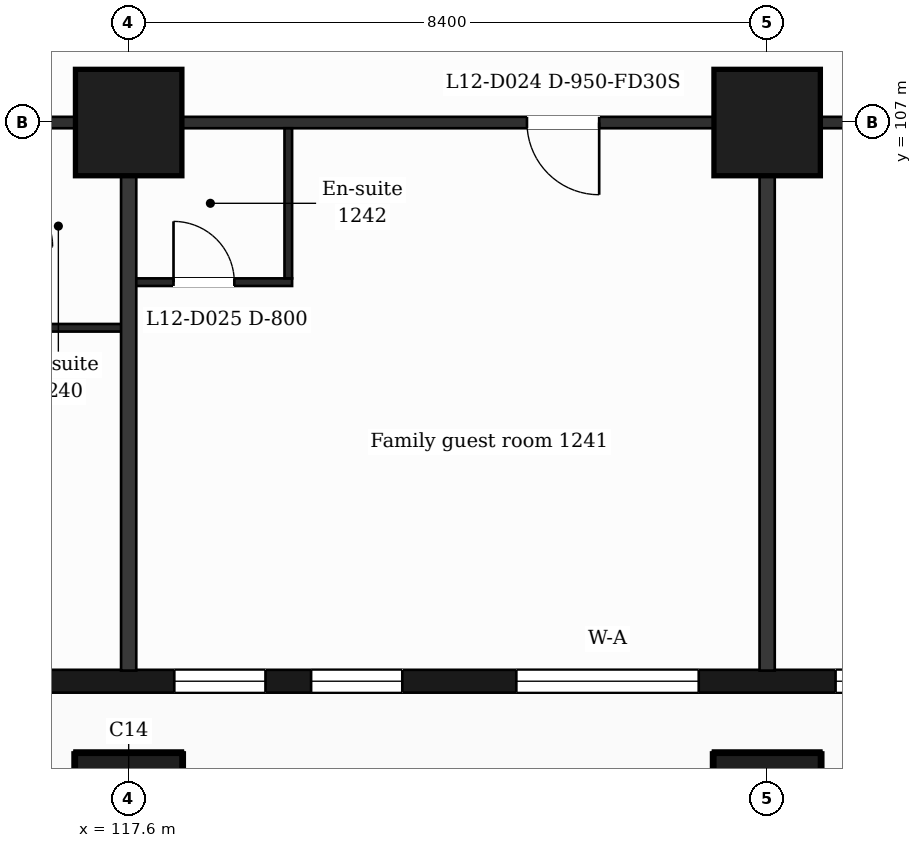
"""IFC4 building model, lengths in metres.
Left out: names, types, materials, properties, quantities, classifications, styles, units other than length and angle.
Written with IfcOpenShell. Run it as: python <this file> out.ifc"""

import sys

from ifc_helpers import new_model, si_unit, direction, frame, frame_2d, origin, origin_2d, place, context, subcontext, project, spatial, rectangle, extrude, element, fill, save


model = new_model("IFC4")
c1 = context("Model", 3, precision=1e-05, world=origin(), true_north=direction((0.0, 1.0)))
c2 = subcontext(c1, "Body", "Model", "MODEL_VIEW")
j1 = project(units=[si_unit("LENGTHUNIT", "METRE"), si_unit("PLANEANGLEUNIT", "RADIAN")], contexts=[c1])
p1 = place(None, origin())
s1 = spatial("IfcSite", under=j1, at=p1, CompositionType="ELEMENT")
p2 = place(p1, origin())
s2 = spatial("IfcBuilding", under=s1, at=p2, CompositionType="ELEMENT")
p3 = place(p2, frame((0.0, 0.0, 60.0)))
s3 = spatial("IfcBuildingStorey", under=s2, at=p3, CompositionType="ELEMENT", Elevation=60.0)
for number, where, z_axis, x_axis in (
    (1, (117.6, 98.0, 0.0), (0.0, 0.0, 1.0), (1.0, 0.0, 0.0)),
    (2, (126.0, 98.0, 0.0), (0.0, 0.0, 1.0), (1.0, 0.0, 0.0)),
    (3, (117.6, 107.0, 0.0), (0.0, 0.0, 1.0), (1.0, 0.0, 0.0)),
    (4, (126.0, 107.0, 0.0), (0.0, 0.0, 1.0), (1.0, 0.0, 0.0)),
):
    element("IfcColumn", number, at=place(p3, frame(where, z_axis=z_axis, x_axis=x_axis)), inside=s3, PredefinedType="COLUMN", context=c2, shape_type="SweptSolid", body=[
        extrude(rectangle(XDim=1.4, YDim=1.4, at=origin_2d()), origin(), (0.0, 0.0, 1.0), 3.5),
    ])
p4 = place(p3, frame((89.85, 99.65, 0.0), z_axis=(0.0, 0.0, 1.0), x_axis=(1.0, 0.0, 0.0)))
e5 = element("IfcWall", 5, at=p4, inside=s3, PredefinedType="SOLIDWALL", context=c2, shape_type="SweptSolid", body=[
    extrude(rectangle(XDim=47.25, YDim=0.3, at=frame_2d((23.625, 0.0))), origin(), (0.0, 0.0, 1.0), 3.18),
])
p5 = place(p4, frame((0.725, 0.0, 0.9)))
e6 = element("IfcOpeningElement", 6, at=p5, cuts=e5, PredefinedType="OPENING", context=c2, shape_type="SweptSolid", body=[
    extrude(rectangle(XDim=1.2, YDim=2.1, at=frame_2d((0.6, 1.05))), frame((0.0, 0.16, 0.0), z_axis=(0.0, -1.0, 0.0), x_axis=(1.0, 0.0, 0.0)), (0.0, 0.0, 1.0), 0.32),
])
p6 = place(p4, frame((3.45, 0.0, 0.9)))
e7 = element("IfcOpeningElement", 7, at=p6, cuts=e5, PredefinedType="OPENING", context=c2, shape_type="SweptSolid", body=[
    extrude(rectangle(XDim=2.4, YDim=2.1, at=frame_2d((1.2, 1.05))), frame((0.0, 0.16, 0.0), z_axis=(0.0, -1.0, 0.0), x_axis=(1.0, 0.0, 0.0)), (0.0, 0.0, 1.0), 0.32),
])
p7 = place(p4, frame((7.65, 0.0, 0.9)))
e8 = element("IfcOpeningElement", 8, at=p7, cuts=e5, PredefinedType="OPENING", context=c2, shape_type="SweptSolid", body=[
    extrude(rectangle(XDim=2.4, YDim=2.1, at=frame_2d((1.2, 1.05))), frame((0.0, 0.16, 0.0), z_axis=(0.0, -1.0, 0.0), x_axis=(1.0, 0.0, 0.0)), (0.0, 0.0, 1.0), 0.32),
])
p8 = place(p4, frame((12.45, 0.0, 0.9)))
e9 = element("IfcOpeningElement", 9, at=p8, cuts=e5, PredefinedType="OPENING", context=c2, shape_type="SweptSolid", body=[
    extrude(rectangle(XDim=1.2, YDim=2.1, at=frame_2d((0.6, 1.05))), frame((0.0, 0.16, 0.0), z_axis=(0.0, -1.0, 0.0), x_axis=(1.0, 0.0, 0.0)), (0.0, 0.0, 1.0), 0.32),
])
p9 = place(p4, frame((16.65, 0.0, 0.9)))
e10 = element("IfcOpeningElement", 10, at=p9, cuts=e5, PredefinedType="OPENING", context=c2, shape_type="SweptSolid", body=[
    extrude(rectangle(XDim=1.2, YDim=2.1, at=frame_2d((0.6, 1.05))), frame((0.0, 0.16, 0.0), z_axis=(0.0, -1.0, 0.0), x_axis=(1.0, 0.0, 0.0)), (0.0, 0.0, 1.0), 0.32),
])
p10 = place(p4, frame((19.95, 0.0, 0.9)))
e11 = element("IfcOpeningElement", 11, at=p10, cuts=e5, PredefinedType="OPENING", context=c2, shape_type="SweptSolid", body=[
    extrude(rectangle(XDim=1.2, YDim=2.1, at=frame_2d((0.6, 1.05))), frame((0.0, 0.16, 0.0), z_axis=(0.0, -1.0, 0.0), x_axis=(1.0, 0.0, 0.0)), (0.0, 0.0, 1.0), 0.32),
])
p11 = place(p4, frame((21.75, 0.0, 0.9)))
e12 = element("IfcOpeningElement", 12, at=p11, cuts=e5, PredefinedType="OPENING", context=c2, shape_type="SweptSolid", body=[
    extrude(rectangle(XDim=1.2, YDim=2.1, at=frame_2d((0.6, 1.05))), frame((0.0, 0.16, 0.0), z_axis=(0.0, -1.0, 0.0), x_axis=(1.0, 0.0, 0.0)), (0.0, 0.0, 1.0), 0.32),
])
p12 = place(p4, frame((25.05, 0.0, 0.0)))
e13 = element("IfcOpeningElement", 13, at=p12, cuts=e5, PredefinedType="OPENING", context=c2, shape_type="SweptSolid", body=[
    extrude(rectangle(XDim=1.2, YDim=2.4, at=frame_2d((0.6, 1.2))), frame((0.0, 0.16, 0.0), z_axis=(0.0, -1.0, 0.0), x_axis=(1.0, 0.0, 0.0)), (0.0, 0.0, 1.0), 0.32),
])
p13 = place(p4, frame((28.35, 0.0, 0.9)))
e14 = element("IfcOpeningElement", 14, at=p13, cuts=e5, PredefinedType="OPENING", context=c2, shape_type="SweptSolid", body=[
    extrude(rectangle(XDim=1.2, YDim=2.1, at=frame_2d((0.6, 1.05))), frame((0.0, 0.16, 0.0), z_axis=(0.0, -1.0, 0.0), x_axis=(1.0, 0.0, 0.0)), (0.0, 0.0, 1.0), 0.32),
])
p14 = place(p4, frame((30.15, 0.0, 0.9)))
e15 = element("IfcOpeningElement", 15, at=p14, cuts=e5, PredefinedType="OPENING", context=c2, shape_type="SweptSolid", body=[
    extrude(rectangle(XDim=1.2, YDim=2.1, at=frame_2d((0.6, 1.05))), frame((0.0, 0.16, 0.0), z_axis=(0.0, -1.0, 0.0), x_axis=(1.0, 0.0, 0.0)), (0.0, 0.0, 1.0), 0.32),
])
p15 = place(p4, frame((32.85, 0.0, 0.9)))
e16 = element("IfcOpeningElement", 16, at=p15, cuts=e5, PredefinedType="OPENING", context=c2, shape_type="SweptSolid", body=[
    extrude(rectangle(XDim=2.4, YDim=2.1, at=frame_2d((1.2, 1.05))), frame((0.0, 0.16, 0.0), z_axis=(0.0, -1.0, 0.0), x_axis=(1.0, 0.0, 0.0)), (0.0, 0.0, 1.0), 0.32),
])
p16 = place(p4, frame((37.05, 0.0, 0.9)))
e17 = element("IfcOpeningElement", 17, at=p16, cuts=e5, PredefinedType="OPENING", context=c2, shape_type="SweptSolid", body=[
    extrude(rectangle(XDim=2.4, YDim=2.1, at=frame_2d((1.2, 1.05))), frame((0.0, 0.16, 0.0), z_axis=(0.0, -1.0, 0.0), x_axis=(1.0, 0.0, 0.0)), (0.0, 0.0, 1.0), 0.32),
])
p17 = place(p4, frame((41.85, 0.0, 0.9)))
e18 = element("IfcOpeningElement", 18, at=p17, cuts=e5, PredefinedType="OPENING", context=c2, shape_type="SweptSolid", body=[
    extrude(rectangle(XDim=1.2, YDim=2.1, at=frame_2d((0.6, 1.05))), frame((0.0, 0.16, 0.0), z_axis=(0.0, -1.0, 0.0), x_axis=(1.0, 0.0, 0.0)), (0.0, 0.0, 1.0), 0.32),
])
p18 = place(p4, frame((45.25, 0.0, 0.9)))
e19 = element("IfcOpeningElement", 19, at=p18, cuts=e5, PredefinedType="OPENING", context=c2, shape_type="SweptSolid", body=[
    extrude(rectangle(XDim=1.2, YDim=2.1, at=frame_2d((0.6, 1.05))), frame((0.0, 0.16, 0.0), z_axis=(0.0, -1.0, 0.0), x_axis=(1.0, 0.0, 0.0)), (0.0, 0.0, 1.0), 0.32),
])
p19 = place(p3, frame((115.75, 104.3, 0.0), z_axis=(0.0, 0.0, 1.0), x_axis=(1.0, 0.0, 0.0)))
e20 = element("IfcWall", 20, at=p19, inside=s3, PredefinedType="PARTITIONING", context=c2, shape_type="SweptSolid", body=[
    extrude(rectangle(XDim=1.85, YDim=0.1, at=frame_2d((0.925, 0.0))), origin(), (0.0, 0.0, 1.0), 3.18),
])
p20 = place(p3, frame((117.6, 104.9, 0.0), z_axis=(0.0, 0.0, 1.0), x_axis=(1.0, 0.0, 0.0)))
e21 = element("IfcWall", 21, at=p20, inside=s3, PredefinedType="PARTITIONING", context=c2, shape_type="SweptSolid", body=[
    extrude(rectangle(XDim=2.15, YDim=0.1, at=frame_2d((1.075, 0.0))), origin(), (0.0, 0.0, 1.0), 3.18),
])
p21 = place(p20, frame((0.59, 0.0, 0.0)))
e22 = element("IfcOpeningElement", 22, at=p21, cuts=e21, PredefinedType="OPENING", context=c2, shape_type="SweptSolid", body=[
    extrude(rectangle(XDim=0.8, YDim=2.1, at=frame_2d((0.4, 1.05))), frame((0.0, 0.06, 0.0), z_axis=(0.0, -1.0, 0.0), x_axis=(1.0, 0.0, 0.0)), (0.0, 0.0, 1.0), 0.12),
])
p22 = place(p3, frame((87.018, 107.0, 0.0), z_axis=(0.0, 0.0, 1.0), x_axis=(1.0, 0.0, 0.0)))
e23 = element("IfcWall", 23, at=p22, inside=s3, PredefinedType="PARTITIONING", context=c2, shape_type="SweptSolid", body=[
    extrude(rectangle(XDim=52.765, YDim=0.15, at=frame_2d((26.382, 0.0))), origin(), (0.0, 0.0, 1.0), 3.18),
])
p23 = place(p22, frame((1.032, 0.0, 0.0)))
e24 = element("IfcOpeningElement", 24, at=p23, cuts=e23, PredefinedType="OPENING", context=c2, shape_type="SweptSolid", body=[
    extrude(rectangle(XDim=0.95, YDim=2.1, at=frame_2d((0.475, 1.05))), frame((0.0, 0.085, 0.0), z_axis=(0.0, -1.0, 0.0), x_axis=(1.0, 0.0, 0.0)), (0.0, 0.0, 1.0), 0.17),
])
p24 = place(p22, frame((6.894, 0.0, 0.0)))
e25 = element("IfcOpeningElement", 25, at=p24, cuts=e23, PredefinedType="OPENING", context=c2, shape_type="SweptSolid", body=[
    extrude(rectangle(XDim=0.95, YDim=2.1, at=frame_2d((0.475, 1.05))), frame((0.0, 0.085, 0.0), z_axis=(0.0, -1.0, 0.0), x_axis=(1.0, 0.0, 0.0)), (0.0, 0.0, 1.0), 0.17),
])
p25 = place(p22, frame((17.844, 0.0, 0.0)))
e26 = element("IfcOpeningElement", 26, at=p25, cuts=e23, PredefinedType="OPENING", context=c2, shape_type="SweptSolid", body=[
    extrude(rectangle(XDim=0.95, YDim=2.1, at=frame_2d((0.475, 1.05))), frame((0.0, 0.085, 0.0), z_axis=(0.0, -1.0, 0.0), x_axis=(1.0, 0.0, 0.0)), (0.0, 0.0, 1.0), 0.17),
])
p26 = place(p22, frame((26.245, 0.0, 0.0)))
e27 = element("IfcOpeningElement", 27, at=p26, cuts=e23, PredefinedType="OPENING", context=c2, shape_type="SweptSolid", body=[
    extrude(rectangle(XDim=0.95, YDim=2.1, at=frame_2d((0.475, 1.05))), frame((0.0, 0.085, 0.0), z_axis=(0.0, -1.0, 0.0), x_axis=(1.0, 0.0, 0.0)), (0.0, 0.0, 1.0), 0.17),
])
p27 = place(p22, frame((35.822, 0.0, 0.0)))
e28 = element("IfcOpeningElement", 28, at=p27, cuts=e23, PredefinedType="OPENING", context=c2, shape_type="SweptSolid", body=[
    extrude(rectangle(XDim=0.95, YDim=2.1, at=frame_2d((0.475, 1.05))), frame((0.0, 0.085, 0.0), z_axis=(0.0, -1.0, 0.0), x_axis=(1.0, 0.0, 0.0)), (0.0, 0.0, 1.0), 0.17),
])
p28 = place(p22, frame((42.302, 0.0, 0.0)))
e29 = element("IfcOpeningElement", 29, at=p28, cuts=e23, PredefinedType="OPENING", context=c2, shape_type="SweptSolid", body=[
    extrude(rectangle(XDim=0.95, YDim=2.1, at=frame_2d((0.475, 1.05))), frame((0.0, 0.085, 0.0), z_axis=(0.0, -1.0, 0.0), x_axis=(1.0, 0.0, 0.0)), (0.0, 0.0, 1.0), 0.17),
])
p29 = place(p22, frame((49.285, 0.0, 0.0)))
e30 = element("IfcOpeningElement", 30, at=p29, cuts=e23, PredefinedType="OPENING", context=c2, shape_type="SweptSolid", body=[
    extrude(rectangle(XDim=0.95, YDim=2.1, at=frame_2d((0.475, 1.05))), frame((0.0, 0.085, 0.0), z_axis=(0.0, -1.0, 0.0), x_axis=(1.0, 0.0, 0.0)), (0.0, 0.0, 1.0), 0.17),
])
p30 = place(p3, frame((117.6, 99.79, 0.0), z_axis=(0.0, 0.0, 1.0), x_axis=(0.0, 1.0, 0.0)))
e31 = element("IfcWall", 31, at=p30, inside=s3, PredefinedType="PARTITIONING", context=c2, shape_type="SweptSolid", body=[
    extrude(rectangle(XDim=7.135, YDim=0.2, at=frame_2d((3.567, 0.0))), origin(), (0.0, 0.0, 1.0), 3.18),
])
p31 = place(p3, frame((119.7, 104.95, 0.0), z_axis=(0.0, 0.0, 1.0), x_axis=(0.0, 1.0, 0.0)))
e32 = element("IfcWall", 32, at=p31, inside=s3, PredefinedType="PARTITIONING", context=c2, shape_type="SweptSolid", body=[
    extrude(rectangle(XDim=1.975, YDim=0.1, at=frame_2d((0.988, 0.0))), origin(), (0.0, 0.0, 1.0), 3.18),
])
p32 = place(p3, frame((126.0, 99.79, 0.0), z_axis=(0.0, 0.0, 1.0), x_axis=(0.0, 1.0, 0.0)))
e33 = element("IfcWall", 33, at=p32, inside=s3, PredefinedType="PARTITIONING", context=c2, shape_type="SweptSolid", body=[
    extrude(rectangle(XDim=7.135, YDim=0.2, at=frame_2d((3.567, 0.0))), origin(), (0.0, 0.0, 1.0), 3.18),
])
p33 = place(p13, origin())
e34 = element("IfcWindow", 34, at=p33, inside=s3, PartitioningType="SINGLE_PANEL", PredefinedType="WINDOW", context=c2, shape_type="SweptSolid", body=[
    extrude(rectangle(XDim=1.2, YDim=2.1, at=frame_2d((0.6, 1.05))), frame((0.0, 0.03, 0.0), z_axis=(0.0, -1.0, 0.0), x_axis=(1.0, 0.0, 0.0)), (0.0, 0.0, 1.0), 0.06),
])
fill(e14, e34)
p34 = place(p14, origin())
e35 = element("IfcWindow", 35, at=p34, inside=s3, PartitioningType="SINGLE_PANEL", PredefinedType="WINDOW", context=c2, shape_type="SweptSolid", body=[
    extrude(rectangle(XDim=1.2, YDim=2.1, at=frame_2d((0.6, 1.05))), frame((0.0, 0.03, 0.0), z_axis=(0.0, -1.0, 0.0), x_axis=(1.0, 0.0, 0.0)), (0.0, 0.0, 1.0), 0.06),
])
fill(e15, e35)
p35 = place(p15, origin())
e36 = element("IfcWindow", 36, at=p35, inside=s3, PartitioningType="SINGLE_PANEL", PredefinedType="WINDOW", context=c2, shape_type="SweptSolid", body=[
    extrude(rectangle(XDim=2.4, YDim=2.1, at=frame_2d((1.2, 1.05))), frame((0.0, 0.03, 0.0), z_axis=(0.0, -1.0, 0.0), x_axis=(1.0, 0.0, 0.0)), (0.0, 0.0, 1.0), 0.06),
])
fill(e16, e36)
p36 = place(p16, origin())
e37 = element("IfcWindow", 37, at=p36, inside=s3, PartitioningType="SINGLE_PANEL", PredefinedType="WINDOW", context=c2, shape_type="SweptSolid", body=[
    extrude(rectangle(XDim=2.4, YDim=2.1, at=frame_2d((1.2, 1.05))), frame((0.0, 0.03, 0.0), z_axis=(0.0, -1.0, 0.0), x_axis=(1.0, 0.0, 0.0)), (0.0, 0.0, 1.0), 0.06),
])
fill(e17, e37)
p37 = place(p27, origin())
e38 = element("IfcDoor", 38, at=p37, inside=s3, OperationType="SINGLE_SWING_RIGHT", PredefinedType="DOOR", context=c2, shape_type="SweptSolid", body=[
    extrude(rectangle(XDim=0.95, YDim=2.1, at=frame_2d((0.475, 1.05))), frame((0.0, 0.025, 0.0), z_axis=(0.0, -1.0, 0.0), x_axis=(1.0, 0.0, 0.0)), (0.0, 0.0, 1.0), 0.05),
])
fill(e28, e38)
p38 = place(p21, origin())
e39 = element("IfcDoor", 39, at=p38, inside=s3, OperationType="SINGLE_SWING_LEFT", PredefinedType="DOOR", context=c2, shape_type="SweptSolid", body=[
    extrude(rectangle(XDim=0.8, YDim=2.1, at=frame_2d((0.4, 1.05))), frame((0.0, 0.025, 0.0), z_axis=(0.0, -1.0, 0.0), x_axis=(1.0, 0.0, 0.0)), (0.0, 0.0, 1.0), 0.05),
])
fill(e22, e39)
save(model, sys.argv[1])
